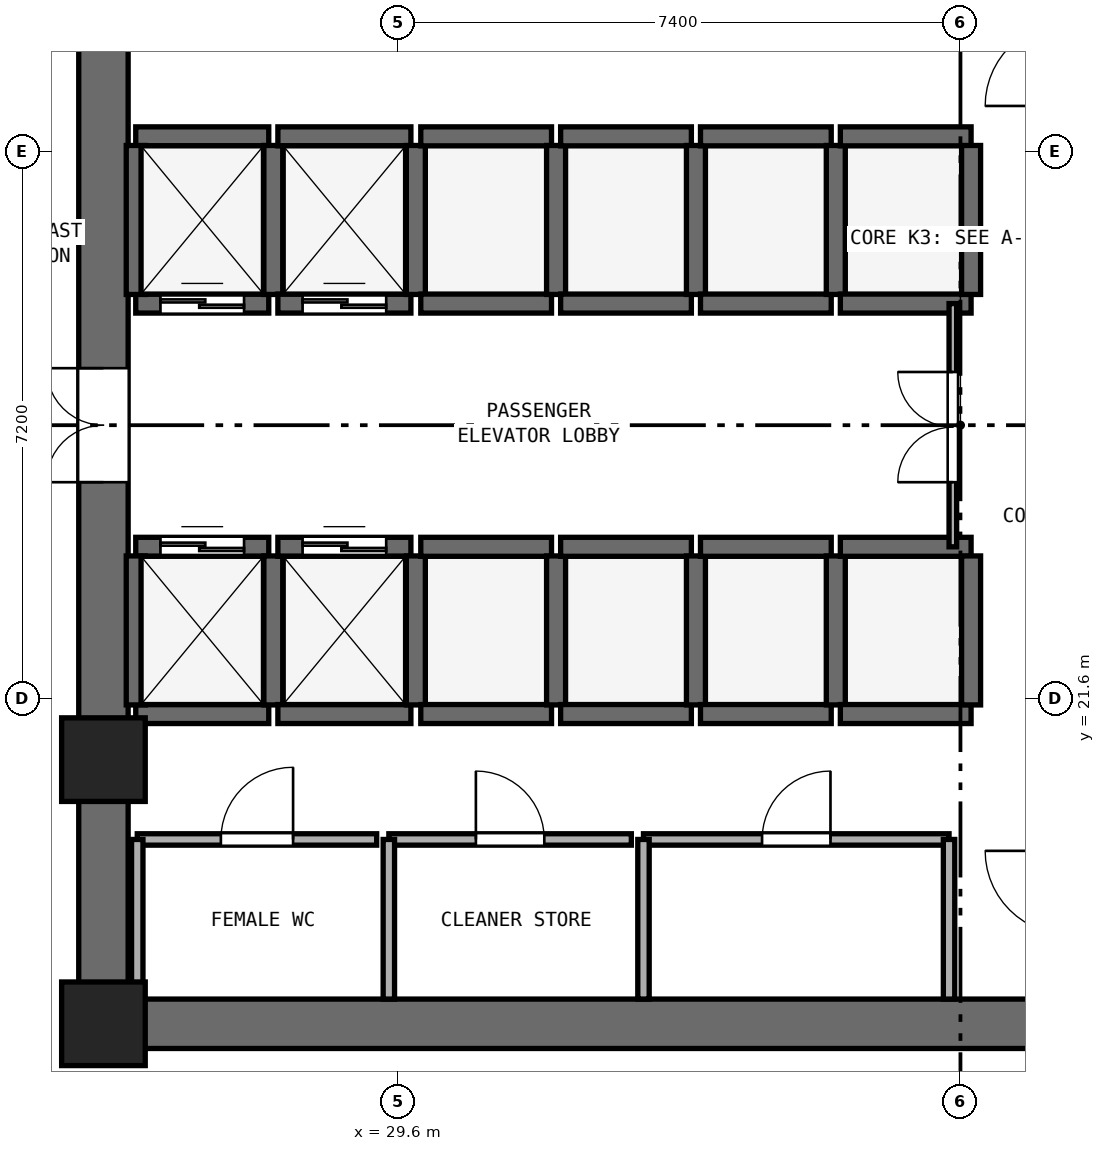
"""IFC4 building model, lengths in metres.
Left out: names, types, materials, properties, quantities, classifications, styles, units other than length and angle.
Written with IfcOpenShell. Run it as: python <this file> out.ifc"""

import sys

from ifc_helpers import new_model, si_unit, direction, frame, frame_2d, origin, origin_2d, place, context, subcontext, project, spatial, rectangle, extrude, element, fill, save


model = new_model("IFC4")
c1 = context("Model", 3, precision=1e-05, world=origin(), true_north=direction((0.0, 1.0)))
c2 = subcontext(c1, "Body", "Model", "MODEL_VIEW")
j1 = project(units=[si_unit("LENGTHUNIT", "METRE"), si_unit("PLANEANGLEUNIT", "RADIAN")], contexts=[c1])
p1 = place(None, origin())
s1 = spatial("IfcSite", under=j1, at=p1, CompositionType="ELEMENT")
p2 = place(p1, origin())
s2 = spatial("IfcBuilding", under=s1, at=p2, CompositionType="ELEMENT")
p3 = place(p2, frame((0.0, 0.0, 112.4)))
s3 = spatial("IfcBuildingStorey", under=s2, at=p3, CompositionType="ELEMENT", Elevation=112.4)
p4 = place(p3, frame((25.4, 17.325, 0.0), z_axis=(0.0, 0.0, 1.0), x_axis=(1.0, 0.0, 0.0)))
e1 = element("IfcWall", 1, at=p4, inside=s3, PredefinedType="SHEAR", context=c2, shape_type="SweptSolid", body=[
    extrude(rectangle(XDim=23.2, YDim=0.65, at=frame_2d((11.6, 0.0))), origin(), (0.0, 0.0, 1.0), 3.525),
])
p5 = place(p3, frame((25.725, 17.65, 0.0), z_axis=(0.0, 0.0, 1.0), x_axis=(0.0, 1.0, 0.0)))
e2 = element("IfcWall", 2, at=p5, inside=s3, PredefinedType="SHEAR", context=c2, shape_type="SweptSolid", body=[
    extrude(rectangle(XDim=15.1, YDim=0.65, at=frame_2d((7.55, 0.0))), origin(), (0.0, 0.0, 1.0), 3.525),
])
p6 = place(p5, frame((6.8, 0.0, 0.0)))
e3 = element("IfcOpeningElement", 3, at=p6, cuts=e2, PredefinedType="OPENING", context=c2, shape_type="SweptSolid", body=[
    extrude(rectangle(XDim=1.5, YDim=2.15, at=frame_2d((0.75, 1.075))), frame((0.0, 0.335, 0.0), z_axis=(0.0, -1.0, 0.0), x_axis=(1.0, 0.0, 0.0)), (0.0, 0.0, 1.0), 0.67),
])
for number, where, z_axis, x_axis in (
    (4, (25.725, 17.325, 0.0), (0.0, 0.0, 1.0), (1.0, 0.0, 0.0)),
    (5, (25.725, 20.8, 0.0), (0.0, 0.0, 1.0), (1.0, 0.0, 0.0)),
):
    element("IfcColumn", number, at=place(p3, frame(where, z_axis=z_axis, x_axis=x_axis)), inside=s3, PredefinedType="PILASTER", context=c2, shape_type="SweptSolid", body=[
        extrude(rectangle(XDim=1.1, YDim=1.1, at=origin_2d()), origin(), (0.0, 0.0, 1.0), 3.8),
    ])
p7 = place(p3, frame((26.15, 26.8, 0.0), z_axis=(0.0, 0.0, 1.0), x_axis=(1.0, 0.0, 0.0)))
e6 = element("IfcWall", 6, at=p7, inside=s3, PredefinedType="SHEAR", context=c2, shape_type="SweptSolid", body=[
    extrude(rectangle(XDim=1.75, YDim=0.25, at=frame_2d((0.875, 0.0))), origin(), (0.0, 0.0, 1.0), 3.525),
])
p8 = place(p7, frame((0.325, 0.0, 0.0)))
e7 = element("IfcOpeningElement", 7, at=p8, cuts=e6, PredefinedType="OPENING", context=c2, shape_type="SweptSolid", body=[
    extrude(rectangle(XDim=1.1, YDim=2.15, at=frame_2d((0.55, 1.075))), frame((0.0, 0.135, 0.0), z_axis=(0.0, -1.0, 0.0), x_axis=(1.0, 0.0, 0.0)), (0.0, 0.0, 1.0), 0.27),
])
p9 = place(p3, frame((26.15, 29.0, 0.0), z_axis=(0.0, 0.0, 1.0), x_axis=(1.0, 0.0, 0.0)))
e8 = element("IfcWall", 8, at=p9, inside=s3, PredefinedType="SHEAR", context=c2, shape_type="SweptSolid", body=[
    extrude(rectangle(XDim=1.75, YDim=0.25, at=frame_2d((0.875, 0.0))), origin(), (0.0, 0.0, 1.0), 3.525),
])
for number, where, z_axis, x_axis in (
    (9, (26.15, 26.92, 0.0), (0.0, 0.0, 1.0), (0.0, 1.0, 0.0)),
    (10, (27.96, 26.92, 0.0), (0.0, 0.0, 1.0), (0.0, 1.0, 0.0)),
):
    element("IfcWall", number, at=place(p3, frame(where, z_axis=z_axis, x_axis=x_axis)), inside=s3, PredefinedType="SHEAR", context=c2, shape_type="SweptSolid", body=[
        extrude(rectangle(XDim=1.96, YDim=0.25, at=frame_2d((0.98, 0.0))), origin(), (0.0, 0.0, 1.0), 3.525),
    ])
p10 = place(p3, frame((28.02, 26.8, 0.0), z_axis=(0.0, 0.0, 1.0), x_axis=(1.0, 0.0, 0.0)))
e11 = element("IfcWall", 11, at=p10, inside=s3, PredefinedType="SHEAR", context=c2, shape_type="SweptSolid", body=[
    extrude(rectangle(XDim=1.75, YDim=0.25, at=frame_2d((0.875, 0.0))), origin(), (0.0, 0.0, 1.0), 3.525),
])
p11 = place(p10, frame((0.325, 0.0, 0.0)))
e12 = element("IfcOpeningElement", 12, at=p11, cuts=e11, PredefinedType="OPENING", context=c2, shape_type="SweptSolid", body=[
    extrude(rectangle(XDim=1.1, YDim=2.15, at=frame_2d((0.55, 1.075))), frame((0.0, 0.135, 0.0), z_axis=(0.0, -1.0, 0.0), x_axis=(1.0, 0.0, 0.0)), (0.0, 0.0, 1.0), 0.27),
])
p12 = place(p3, frame((28.02, 29.0, 0.0), z_axis=(0.0, 0.0, 1.0), x_axis=(1.0, 0.0, 0.0)))
e13 = element("IfcWall", 13, at=p12, inside=s3, PredefinedType="SHEAR", context=c2, shape_type="SweptSolid", body=[
    extrude(rectangle(XDim=1.75, YDim=0.25, at=frame_2d((0.875, 0.0))), origin(), (0.0, 0.0, 1.0), 3.525),
])
p13 = place(p3, frame((29.835, 26.92, 0.0), z_axis=(0.0, 0.0, 1.0), x_axis=(0.0, 1.0, 0.0)))
e14 = element("IfcWall", 14, at=p13, inside=s3, PredefinedType="SHEAR", context=c2, shape_type="SweptSolid", body=[
    extrude(rectangle(XDim=1.96, YDim=0.25, at=frame_2d((0.98, 0.0))), origin(), (0.0, 0.0, 1.0), 3.525),
])
p14 = place(p3, frame((26.15, 21.4, 0.0), z_axis=(0.0, 0.0, 1.0), x_axis=(1.0, 0.0, 0.0)))
e15 = element("IfcWall", 15, at=p14, inside=s3, PredefinedType="SHEAR", context=c2, shape_type="SweptSolid", body=[
    extrude(rectangle(XDim=1.75, YDim=0.25, at=frame_2d((0.875, 0.0))), origin(), (0.0, 0.0, 1.0), 3.525),
])
p15 = place(p3, frame((26.15, 23.6, 0.0), z_axis=(0.0, 0.0, 1.0), x_axis=(1.0, 0.0, 0.0)))
e16 = element("IfcWall", 16, at=p15, inside=s3, PredefinedType="SHEAR", context=c2, shape_type="SweptSolid", body=[
    extrude(rectangle(XDim=1.75, YDim=0.25, at=frame_2d((0.875, 0.0))), origin(), (0.0, 0.0, 1.0), 3.525),
])
p16 = place(p15, frame((0.325, 0.0, 0.0)))
e17 = element("IfcOpeningElement", 17, at=p16, cuts=e16, PredefinedType="OPENING", context=c2, shape_type="SweptSolid", body=[
    extrude(rectangle(XDim=1.1, YDim=2.15, at=frame_2d((0.55, 1.075))), frame((0.0, 0.135, 0.0), z_axis=(0.0, -1.0, 0.0), x_axis=(1.0, 0.0, 0.0)), (0.0, 0.0, 1.0), 0.27),
])
for number, where, z_axis, x_axis in (
    (18, (26.15, 21.52, 0.0), (0.0, 0.0, 1.0), (0.0, 1.0, 0.0)),
    (19, (27.96, 21.52, 0.0), (0.0, 0.0, 1.0), (0.0, 1.0, 0.0)),
):
    element("IfcWall", number, at=place(p3, frame(where, z_axis=z_axis, x_axis=x_axis)), inside=s3, PredefinedType="SHEAR", context=c2, shape_type="SweptSolid", body=[
        extrude(rectangle(XDim=1.96, YDim=0.25, at=frame_2d((0.98, 0.0))), origin(), (0.0, 0.0, 1.0), 3.525),
    ])
p17 = place(p3, frame((28.02, 21.4, 0.0), z_axis=(0.0, 0.0, 1.0), x_axis=(1.0, 0.0, 0.0)))
e20 = element("IfcWall", 20, at=p17, inside=s3, PredefinedType="SHEAR", context=c2, shape_type="SweptSolid", body=[
    extrude(rectangle(XDim=1.75, YDim=0.25, at=frame_2d((0.875, 0.0))), origin(), (0.0, 0.0, 1.0), 3.525),
])
p18 = place(p3, frame((28.02, 23.6, 0.0), z_axis=(0.0, 0.0, 1.0), x_axis=(1.0, 0.0, 0.0)))
e21 = element("IfcWall", 21, at=p18, inside=s3, PredefinedType="SHEAR", context=c2, shape_type="SweptSolid", body=[
    extrude(rectangle(XDim=1.75, YDim=0.25, at=frame_2d((0.875, 0.0))), origin(), (0.0, 0.0, 1.0), 3.525),
])
p19 = place(p18, frame((0.325, 0.0, 0.0)))
e22 = element("IfcOpeningElement", 22, at=p19, cuts=e21, PredefinedType="OPENING", context=c2, shape_type="SweptSolid", body=[
    extrude(rectangle(XDim=1.1, YDim=2.15, at=frame_2d((0.55, 1.075))), frame((0.0, 0.135, 0.0), z_axis=(0.0, -1.0, 0.0), x_axis=(1.0, 0.0, 0.0)), (0.0, 0.0, 1.0), 0.27),
])
p20 = place(p3, frame((29.835, 21.52, 0.0), z_axis=(0.0, 0.0, 1.0), x_axis=(0.0, 1.0, 0.0)))
e23 = element("IfcWall", 23, at=p20, inside=s3, PredefinedType="SHEAR", context=c2, shape_type="SweptSolid", body=[
    extrude(rectangle(XDim=1.96, YDim=0.25, at=frame_2d((0.98, 0.0))), origin(), (0.0, 0.0, 1.0), 3.525),
])
for number, where, z_axis, x_axis in (
    (24, (29.9, 21.4, 0.0), (0.0, 0.0, 1.0), (1.0, 0.0, 0.0)),
    (25, (29.9, 23.6, 0.0), (0.0, 0.0, 1.0), (1.0, 0.0, 0.0)),
):
    element("IfcWall", number, at=place(p3, frame(where, z_axis=z_axis, x_axis=x_axis)), inside=s3, PredefinedType="SHEAR", context=c2, shape_type="SweptSolid", body=[
        extrude(rectangle(XDim=1.72, YDim=0.25, at=frame_2d((0.86, 0.0))), origin(), (0.0, 0.0, 1.0), 3.525),
    ])
p21 = place(p3, frame((31.68, 21.52, 0.0), z_axis=(0.0, 0.0, 1.0), x_axis=(0.0, 1.0, 0.0)))
e26 = element("IfcWall", 26, at=p21, inside=s3, PredefinedType="SHEAR", context=c2, shape_type="SweptSolid", body=[
    extrude(rectangle(XDim=1.96, YDim=0.25, at=frame_2d((0.98, 0.0))), origin(), (0.0, 0.0, 1.0), 3.525),
])
for number, where, z_axis, x_axis in (
    (27, (31.74, 21.4, 0.0), (0.0, 0.0, 1.0), (1.0, 0.0, 0.0)),
    (28, (31.74, 23.6, 0.0), (0.0, 0.0, 1.0), (1.0, 0.0, 0.0)),
):
    element("IfcWall", number, at=place(p3, frame(where, z_axis=z_axis, x_axis=x_axis)), inside=s3, PredefinedType="SHEAR", context=c2, shape_type="SweptSolid", body=[
        extrude(rectangle(XDim=1.72, YDim=0.25, at=frame_2d((0.86, 0.0))), origin(), (0.0, 0.0, 1.0), 3.525),
    ])
p22 = place(p3, frame((33.52, 21.52, 0.0), z_axis=(0.0, 0.0, 1.0), x_axis=(0.0, 1.0, 0.0)))
e29 = element("IfcWall", 29, at=p22, inside=s3, PredefinedType="SHEAR", context=c2, shape_type="SweptSolid", body=[
    extrude(rectangle(XDim=1.96, YDim=0.25, at=frame_2d((0.98, 0.0))), origin(), (0.0, 0.0, 1.0), 3.525),
])
for number, where, z_axis, x_axis in (
    (30, (33.58, 21.4, 0.0), (0.0, 0.0, 1.0), (1.0, 0.0, 0.0)),
    (31, (33.58, 23.6, 0.0), (0.0, 0.0, 1.0), (1.0, 0.0, 0.0)),
):
    element("IfcWall", number, at=place(p3, frame(where, z_axis=z_axis, x_axis=x_axis)), inside=s3, PredefinedType="SHEAR", context=c2, shape_type="SweptSolid", body=[
        extrude(rectangle(XDim=1.72, YDim=0.25, at=frame_2d((0.86, 0.0))), origin(), (0.0, 0.0, 1.0), 3.525),
    ])
p23 = place(p3, frame((35.36, 21.52, 0.0), z_axis=(0.0, 0.0, 1.0), x_axis=(0.0, 1.0, 0.0)))
e32 = element("IfcWall", 32, at=p23, inside=s3, PredefinedType="SHEAR", context=c2, shape_type="SweptSolid", body=[
    extrude(rectangle(XDim=1.96, YDim=0.25, at=frame_2d((0.98, 0.0))), origin(), (0.0, 0.0, 1.0), 3.525),
])
for number, where, z_axis, x_axis in (
    (33, (35.42, 21.4, 0.0), (0.0, 0.0, 1.0), (1.0, 0.0, 0.0)),
    (34, (35.42, 23.6, 0.0), (0.0, 0.0, 1.0), (1.0, 0.0, 0.0)),
):
    element("IfcWall", number, at=place(p3, frame(where, z_axis=z_axis, x_axis=x_axis)), inside=s3, PredefinedType="SHEAR", context=c2, shape_type="SweptSolid", body=[
        extrude(rectangle(XDim=1.72, YDim=0.25, at=frame_2d((0.86, 0.0))), origin(), (0.0, 0.0, 1.0), 3.525),
    ])
p24 = place(p3, frame((37.14, 21.52, 0.0), z_axis=(0.0, 0.0, 1.0), x_axis=(0.0, 1.0, 0.0)))
e35 = element("IfcWall", 35, at=p24, inside=s3, PredefinedType="SHEAR", context=c2, shape_type="SweptSolid", body=[
    extrude(rectangle(XDim=1.96, YDim=0.25, at=frame_2d((0.98, 0.0))), origin(), (0.0, 0.0, 1.0), 3.525),
])
for number, where, z_axis, x_axis in (
    (36, (29.9, 26.8, 0.0), (0.0, 0.0, 1.0), (1.0, 0.0, 0.0)),
    (37, (29.9, 29.0, 0.0), (0.0, 0.0, 1.0), (1.0, 0.0, 0.0)),
):
    element("IfcWall", number, at=place(p3, frame(where, z_axis=z_axis, x_axis=x_axis)), inside=s3, PredefinedType="SHEAR", context=c2, shape_type="SweptSolid", body=[
        extrude(rectangle(XDim=1.72, YDim=0.25, at=frame_2d((0.86, 0.0))), origin(), (0.0, 0.0, 1.0), 3.525),
    ])
p25 = place(p3, frame((31.68, 26.92, 0.0), z_axis=(0.0, 0.0, 1.0), x_axis=(0.0, 1.0, 0.0)))
e38 = element("IfcWall", 38, at=p25, inside=s3, PredefinedType="SHEAR", context=c2, shape_type="SweptSolid", body=[
    extrude(rectangle(XDim=1.96, YDim=0.25, at=frame_2d((0.98, 0.0))), origin(), (0.0, 0.0, 1.0), 3.525),
])
for number, where, z_axis, x_axis in (
    (39, (31.74, 26.8, 0.0), (0.0, 0.0, 1.0), (1.0, 0.0, 0.0)),
    (40, (31.74, 29.0, 0.0), (0.0, 0.0, 1.0), (1.0, 0.0, 0.0)),
):
    element("IfcWall", number, at=place(p3, frame(where, z_axis=z_axis, x_axis=x_axis)), inside=s3, PredefinedType="SHEAR", context=c2, shape_type="SweptSolid", body=[
        extrude(rectangle(XDim=1.72, YDim=0.25, at=frame_2d((0.86, 0.0))), origin(), (0.0, 0.0, 1.0), 3.525),
    ])
p26 = place(p3, frame((33.52, 26.92, 0.0), z_axis=(0.0, 0.0, 1.0), x_axis=(0.0, 1.0, 0.0)))
e41 = element("IfcWall", 41, at=p26, inside=s3, PredefinedType="SHEAR", context=c2, shape_type="SweptSolid", body=[
    extrude(rectangle(XDim=1.96, YDim=0.25, at=frame_2d((0.98, 0.0))), origin(), (0.0, 0.0, 1.0), 3.525),
])
for number, where, z_axis, x_axis in (
    (42, (33.58, 26.8, 0.0), (0.0, 0.0, 1.0), (1.0, 0.0, 0.0)),
    (43, (33.58, 29.0, 0.0), (0.0, 0.0, 1.0), (1.0, 0.0, 0.0)),
):
    element("IfcWall", number, at=place(p3, frame(where, z_axis=z_axis, x_axis=x_axis)), inside=s3, PredefinedType="SHEAR", context=c2, shape_type="SweptSolid", body=[
        extrude(rectangle(XDim=1.72, YDim=0.25, at=frame_2d((0.86, 0.0))), origin(), (0.0, 0.0, 1.0), 3.525),
    ])
p27 = place(p3, frame((35.36, 26.92, 0.0), z_axis=(0.0, 0.0, 1.0), x_axis=(0.0, 1.0, 0.0)))
e44 = element("IfcWall", 44, at=p27, inside=s3, PredefinedType="SHEAR", context=c2, shape_type="SweptSolid", body=[
    extrude(rectangle(XDim=1.96, YDim=0.25, at=frame_2d((0.98, 0.0))), origin(), (0.0, 0.0, 1.0), 3.525),
])
for number, where, z_axis, x_axis in (
    (45, (35.42, 26.8, 0.0), (0.0, 0.0, 1.0), (1.0, 0.0, 0.0)),
    (46, (35.42, 29.0, 0.0), (0.0, 0.0, 1.0), (1.0, 0.0, 0.0)),
):
    element("IfcWall", number, at=place(p3, frame(where, z_axis=z_axis, x_axis=x_axis)), inside=s3, PredefinedType="SHEAR", context=c2, shape_type="SweptSolid", body=[
        extrude(rectangle(XDim=1.72, YDim=0.25, at=frame_2d((0.86, 0.0))), origin(), (0.0, 0.0, 1.0), 3.525),
    ])
p28 = place(p3, frame((37.14, 26.92, 0.0), z_axis=(0.0, 0.0, 1.0), x_axis=(0.0, 1.0, 0.0)))
e47 = element("IfcWall", 47, at=p28, inside=s3, PredefinedType="SHEAR", context=c2, shape_type="SweptSolid", body=[
    extrude(rectangle(XDim=1.96, YDim=0.25, at=frame_2d((0.98, 0.0))), origin(), (0.0, 0.0, 1.0), 3.525),
])
p29 = place(p3, frame((26.17, 19.75, 0.0), z_axis=(0.0, 0.0, 1.0), x_axis=(1.0, 0.0, 0.0)))
e48 = element("IfcWall", 48, at=p29, inside=s3, PredefinedType="PARTITIONING", context=c2, shape_type="SweptSolid", body=[
    extrude(rectangle(XDim=3.15, YDim=0.15, at=frame_2d((1.575, 0.0))), origin(), (0.0, 0.0, 1.0), 3.525),
])
p30 = place(p29, frame((1.1, 0.0, 0.0)))
e49 = element("IfcOpeningElement", 49, at=p30, cuts=e48, PredefinedType="OPENING", context=c2, shape_type="SweptSolid", body=[
    extrude(rectangle(XDim=0.95, YDim=2.1, at=frame_2d((0.475, 1.05))), frame((0.0, 0.085, 0.0), z_axis=(0.0, -1.0, 0.0), x_axis=(1.0, 0.0, 0.0)), (0.0, 0.0, 1.0), 0.17),
])
p31 = place(p3, frame((26.17, 17.65, 0.0), z_axis=(0.0, 0.0, 1.0), x_axis=(0.0, 1.0, 0.0)))
e50 = element("IfcWall", 50, at=p31, inside=s3, PredefinedType="PARTITIONING", context=c2, shape_type="SweptSolid", body=[
    extrude(rectangle(XDim=2.1, YDim=0.15, at=frame_2d((1.05, 0.0))), origin(), (0.0, 0.0, 1.0), 3.525),
])
p32 = place(p3, frame((29.48, 19.75, 0.0), z_axis=(0.0, 0.0, 1.0), x_axis=(1.0, 0.0, 0.0)))
e51 = element("IfcWall", 51, at=p32, inside=s3, PredefinedType="PARTITIONING", context=c2, shape_type="SweptSolid", body=[
    extrude(rectangle(XDim=3.19, YDim=0.15, at=frame_2d((1.595, 0.0))), origin(), (0.0, 0.0, 1.0), 3.525),
])
p33 = place(p32, frame((1.145, 0.0, 0.0)))
e52 = element("IfcOpeningElement", 52, at=p33, cuts=e51, PredefinedType="OPENING", context=c2, shape_type="SweptSolid", body=[
    extrude(rectangle(XDim=0.9, YDim=2.1, at=frame_2d((0.45, 1.05))), frame((0.0, 0.085, 0.0), z_axis=(0.0, -1.0, 0.0), x_axis=(1.0, 0.0, 0.0)), (0.0, 0.0, 1.0), 0.17),
])
p34 = place(p3, frame((29.48, 17.65, 0.0), z_axis=(0.0, 0.0, 1.0), x_axis=(0.0, 1.0, 0.0)))
e53 = element("IfcWall", 53, at=p34, inside=s3, PredefinedType="PARTITIONING", context=c2, shape_type="SweptSolid", body=[
    extrude(rectangle(XDim=2.1, YDim=0.15, at=frame_2d((1.05, 0.0))), origin(), (0.0, 0.0, 1.0), 3.525),
])
p35 = place(p3, frame((32.83, 19.75, 0.0), z_axis=(0.0, 0.0, 1.0), x_axis=(1.0, 0.0, 0.0)))
e54 = element("IfcWall", 54, at=p35, inside=s3, PredefinedType="PARTITIONING", context=c2, shape_type="SweptSolid", body=[
    extrude(rectangle(XDim=4.02, YDim=0.15, at=frame_2d((2.01, 0.0))), origin(), (0.0, 0.0, 1.0), 3.525),
])
p36 = place(p35, frame((1.56, 0.0, 0.0)))
e55 = element("IfcOpeningElement", 55, at=p36, cuts=e54, PredefinedType="OPENING", context=c2, shape_type="SweptSolid", body=[
    extrude(rectangle(XDim=0.9, YDim=2.1, at=frame_2d((0.45, 1.05))), frame((0.0, 0.085, 0.0), z_axis=(0.0, -1.0, 0.0), x_axis=(1.0, 0.0, 0.0)), (0.0, 0.0, 1.0), 0.17),
])
for number, where, z_axis, x_axis in (
    (56, (32.83, 17.65, 0.0), (0.0, 0.0, 1.0), (0.0, 1.0, 0.0)),
    (57, (36.85, 17.65, 0.0), (0.0, 0.0, 1.0), (0.0, 1.0, 0.0)),
):
    element("IfcWall", number, at=place(p3, frame(where, z_axis=z_axis, x_axis=x_axis)), inside=s3, PredefinedType="PARTITIONING", context=c2, shape_type="SweptSolid", body=[
        extrude(rectangle(XDim=2.1, YDim=0.15, at=frame_2d((1.05, 0.0))), origin(), (0.0, 0.0, 1.0), 3.525),
    ])
p37 = place(p3, frame((36.9, 23.6, 0.0), z_axis=(0.0, 0.0, 1.0), x_axis=(0.0, 1.0, 0.0)))
e58 = element("IfcWall", 58, at=p37, inside=s3, PredefinedType="PARTITIONING", context=c2, shape_type="SweptSolid", body=[
    extrude(rectangle(XDim=3.2, YDim=0.1, at=frame_2d((1.6, 0.0))), origin(), (0.0, 0.0, 1.0), 3.525),
])
p38 = place(p37, frame((0.85, 0.0, 0.0)))
e59 = element("IfcOpeningElement", 59, at=p38, cuts=e58, PredefinedType="OPENING", context=c2, shape_type="SweptSolid", body=[
    extrude(rectangle(XDim=1.45, YDim=2.12, at=frame_2d((0.725, 1.06))), frame((0.0, 0.06, 0.0), z_axis=(0.0, -1.0, 0.0), x_axis=(1.0, 0.0, 0.0)), (0.0, 0.0, 1.0), 0.12),
])
p39 = place(p8, origin())
e60 = element("IfcDoor", 60, at=p39, inside=s3, OperationType="DOUBLE_DOOR_SLIDING", PredefinedType="DOOR", context=c2, shape_type="SweptSolid", body=[
    extrude(rectangle(XDim=1.1, YDim=2.15, at=frame_2d((0.55, 1.075))), frame((0.0, 0.025, 0.0), z_axis=(0.0, -1.0, 0.0), x_axis=(1.0, 0.0, 0.0)), (0.0, 0.0, 1.0), 0.05),
])
fill(e7, e60)
p40 = place(p11, origin())
e61 = element("IfcDoor", 61, at=p40, inside=s3, OperationType="DOUBLE_DOOR_SLIDING", PredefinedType="DOOR", context=c2, shape_type="SweptSolid", body=[
    extrude(rectangle(XDim=1.1, YDim=2.15, at=frame_2d((0.55, 1.075))), frame((0.0, 0.025, 0.0), z_axis=(0.0, -1.0, 0.0), x_axis=(1.0, 0.0, 0.0)), (0.0, 0.0, 1.0), 0.05),
])
fill(e12, e61)
p41 = place(p16, origin())
e62 = element("IfcDoor", 62, at=p41, inside=s3, OperationType="DOUBLE_DOOR_SLIDING", PredefinedType="DOOR", context=c2, shape_type="SweptSolid", body=[
    extrude(rectangle(XDim=1.1, YDim=2.15, at=frame_2d((0.55, 1.075))), frame((0.0, 0.025, 0.0), z_axis=(0.0, -1.0, 0.0), x_axis=(1.0, 0.0, 0.0)), (0.0, 0.0, 1.0), 0.05),
])
fill(e17, e62)
p42 = place(p19, origin())
e63 = element("IfcDoor", 63, at=p42, inside=s3, OperationType="DOUBLE_DOOR_SLIDING", PredefinedType="DOOR", context=c2, shape_type="SweptSolid", body=[
    extrude(rectangle(XDim=1.1, YDim=2.15, at=frame_2d((0.55, 1.075))), frame((0.0, 0.025, 0.0), z_axis=(0.0, -1.0, 0.0), x_axis=(1.0, 0.0, 0.0)), (0.0, 0.0, 1.0), 0.05),
])
fill(e22, e63)
p43 = place(p6, origin())
e64 = element("IfcDoor", 64, at=p43, inside=s3, OperationType="DOUBLE_DOOR_SINGLE_SWING", PredefinedType="DOOR", context=c2, shape_type="SweptSolid", body=[
    extrude(rectangle(XDim=1.5, YDim=2.15, at=frame_2d((0.75, 1.075))), frame((0.0, 0.025, 0.0), z_axis=(0.0, -1.0, 0.0), x_axis=(1.0, 0.0, 0.0)), (0.0, 0.0, 1.0), 0.05),
])
fill(e3, e64)
p44 = place(p30, origin())
e65 = element("IfcDoor", 65, at=p44, inside=s3, OperationType="SINGLE_SWING_RIGHT", PredefinedType="DOOR", context=c2, shape_type="SweptSolid", body=[
    extrude(rectangle(XDim=0.95, YDim=2.1, at=frame_2d((0.475, 1.05))), frame((0.0, 0.025, 0.0), z_axis=(0.0, -1.0, 0.0), x_axis=(1.0, 0.0, 0.0)), (0.0, 0.0, 1.0), 0.05),
])
fill(e49, e65)
p45 = place(p33, origin())
e66 = element("IfcDoor", 66, at=p45, inside=s3, OperationType="SINGLE_SWING_LEFT", PredefinedType="DOOR", context=c2, shape_type="SweptSolid", body=[
    extrude(rectangle(XDim=0.9, YDim=2.1, at=frame_2d((0.45, 1.05))), frame((0.0, 0.025, 0.0), z_axis=(0.0, -1.0, 0.0), x_axis=(1.0, 0.0, 0.0)), (0.0, 0.0, 1.0), 0.05),
])
fill(e52, e66)
p46 = place(p36, origin())
e67 = element("IfcDoor", 67, at=p46, inside=s3, OperationType="SINGLE_SWING_RIGHT", PredefinedType="DOOR", context=c2, shape_type="SweptSolid", body=[
    extrude(rectangle(XDim=0.9, YDim=2.1, at=frame_2d((0.45, 1.05))), frame((0.0, 0.025, 0.0), z_axis=(0.0, -1.0, 0.0), x_axis=(1.0, 0.0, 0.0)), (0.0, 0.0, 1.0), 0.05),
])
fill(e55, e67)
p47 = place(p38, origin())
e68 = element("IfcDoor", 68, at=p47, inside=s3, OperationType="DOUBLE_DOOR_SINGLE_SWING", PredefinedType="DOOR", context=c2, shape_type="SweptSolid", body=[
    extrude(rectangle(XDim=1.45, YDim=2.12, at=frame_2d((0.725, 1.06))), frame((0.0, 0.025, 0.0), z_axis=(0.0, -1.0, 0.0), x_axis=(1.0, 0.0, 0.0)), (0.0, 0.0, 1.0), 0.05),
])
fill(e59, e68)
save(model, sys.argv[1])
